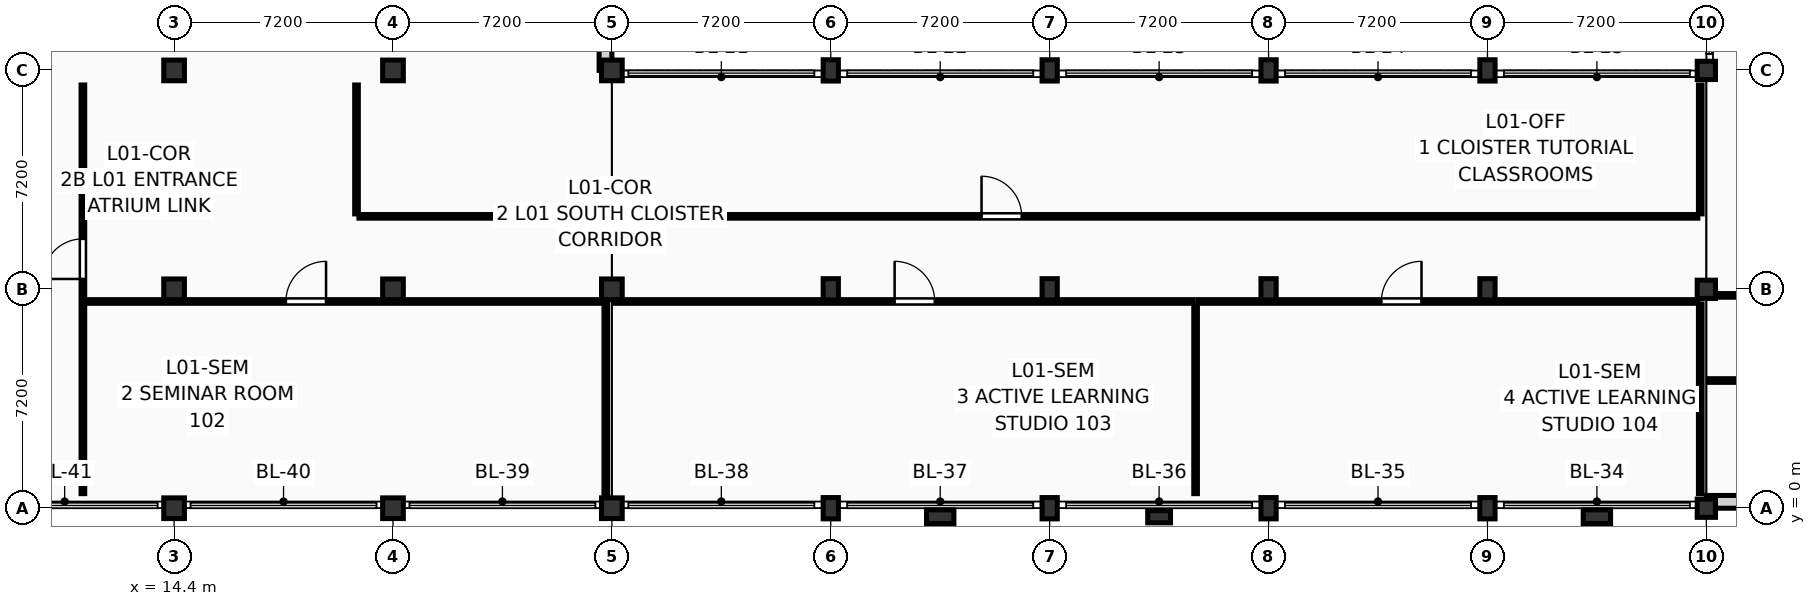
"""IFC4 building model, lengths in metres.
Left out: names, types, materials, properties, quantities, classifications, styles, units other than length and angle.
Written with IfcOpenShell. Run it as: python <this file> out.ifc"""

import sys

from ifc_helpers import new_model, si_unit, direction, frame, frame_2d, origin, origin_2d, place, context, subcontext, project, spatial, rectangle, extrude, element, fill, save


model = new_model("IFC4")
c1 = context("Model", 3, precision=1e-05, world=origin(), true_north=direction((0.0, 1.0)))
c2 = subcontext(c1, "Body", "Model", "MODEL_VIEW")
j1 = project(units=[si_unit("LENGTHUNIT", "METRE"), si_unit("PLANEANGLEUNIT", "RADIAN")], contexts=[c1])
p1 = place(None, origin())
s1 = spatial("IfcSite", under=j1, at=p1, CompositionType="ELEMENT")
p2 = place(p1, origin())
s2 = spatial("IfcBuilding", under=s1, at=p2, CompositionType="ELEMENT")
p3 = place(p2, frame((0.0, 0.0, 4.5)))
s3 = spatial("IfcBuildingStorey", under=s2, at=p3, CompositionType="ELEMENT", Elevation=4.5)
for number, where, z_axis, x_axis in (
    (1, (14.4, 0.0, 0.0), (0.0, 0.0, 1.0), (1.0, 0.0, 0.0)),
    (2, (14.4, 7.2, 0.0), (0.0, 0.0, 1.0), (1.0, 0.0, 0.0)),
    (3, (14.4, 14.4, 0.0), (0.0, 0.0, 1.0), (1.0, 0.0, 0.0)),
    (4, (21.6, 0.0, 0.0), (0.0, 0.0, 1.0), (1.0, 0.0, 0.0)),
    (5, (21.6, 7.2, 0.0), (0.0, 0.0, 1.0), (1.0, 0.0, 0.0)),
    (6, (21.6, 14.4, 0.0), (0.0, 0.0, 1.0), (1.0, 0.0, 0.0)),
    (7, (28.8, 0.0, 0.0), (0.0, 0.0, 1.0), (1.0, 0.0, 0.0)),
    (8, (28.8, 7.2, 0.0), (0.0, 0.0, 1.0), (1.0, 0.0, 0.0)),
    (9, (28.8, 14.4, 0.0), (0.0, 0.0, 1.0), (1.0, 0.0, 0.0)),
):
    element("IfcColumn", number, at=place(p3, frame(where, z_axis=z_axis, x_axis=x_axis)), inside=s3, PredefinedType="COLUMN", context=c2, shape_type="SweptSolid", body=[
        extrude(rectangle(XDim=0.68, YDim=0.68, at=origin_2d()), origin(), (0.0, 0.0, 1.0), 4.05),
    ])
for number, where, z_axis, x_axis in (
    (10, (36.0, 0.0, 0.0), (0.0, 0.0, 1.0), (1.0, 0.0, 0.0)),
    (11, (36.0, 7.2, 0.0), (0.0, 0.0, 1.0), (1.0, 0.0, 0.0)),
    (12, (36.0, 14.4, 0.0), (0.0, 0.0, 1.0), (1.0, 0.0, 0.0)),
    (13, (43.2, 0.0, 0.0), (0.0, 0.0, 1.0), (1.0, 0.0, 0.0)),
    (14, (43.2, 7.2, 0.0), (0.0, 0.0, 1.0), (1.0, 0.0, 0.0)),
    (15, (43.2, 14.4, 0.0), (0.0, 0.0, 1.0), (1.0, 0.0, 0.0)),
    (16, (50.4, 0.0, 0.0), (0.0, 0.0, 1.0), (1.0, 0.0, 0.0)),
    (17, (50.4, 7.2, 0.0), (0.0, 0.0, 1.0), (1.0, 0.0, 0.0)),
    (18, (50.4, 14.4, 0.0), (0.0, 0.0, 1.0), (1.0, 0.0, 0.0)),
    (19, (57.6, 0.0, 0.0), (0.0, 0.0, 1.0), (1.0, 0.0, 0.0)),
    (20, (57.6, 7.2, 0.0), (0.0, 0.0, 1.0), (1.0, 0.0, 0.0)),
    (21, (57.6, 14.4, 0.0), (0.0, 0.0, 1.0), (1.0, 0.0, 0.0)),
):
    element("IfcColumn", number, at=place(p3, frame(where, z_axis=z_axis, x_axis=x_axis)), inside=s3, PredefinedType="COLUMN", context=c2, shape_type="SweptSolid", body=[
        extrude(rectangle(XDim=0.5, YDim=0.7, at=origin_2d()), origin(), (0.0, 0.0, 1.0), 4.05),
    ])
for number, where, z_axis, x_axis in (
    (22, (64.8, 0.0, 0.0), (0.0, 0.0, 1.0), (1.0, 0.0, 0.0)),
    (23, (64.8, 7.2, 0.0), (0.0, 0.0, 1.0), (1.0, 0.0, 0.0)),
    (24, (64.8, 14.4, 0.0), (0.0, 0.0, 1.0), (1.0, 0.0, 0.0)),
):
    element("IfcColumn", number, at=place(p3, frame(where, z_axis=z_axis, x_axis=x_axis)), inside=s3, PredefinedType="COLUMN", context=c2, shape_type="SweptSolid", body=[
        extrude(rectangle(XDim=0.6, YDim=0.6, at=origin_2d()), origin(), (0.0, 0.0, 1.0), 4.05),
    ])
p4 = place(p3, frame((39.6, -0.28, 0.0), z_axis=(0.0, 0.0, 1.0), x_axis=(0.0, 1.0, 0.0)))
e25 = element("IfcColumn", 25, at=p4, inside=s3, PredefinedType="PILASTER", context=c2, shape_type="SweptSolid", body=[
    extrude(rectangle(XDim=0.45, YDim=0.9, at=origin_2d()), origin(), (0.0, 0.0, 1.0), 4.05),
])
p5 = place(p3, frame((46.8, -0.28, 0.0), z_axis=(0.0, 0.0, 1.0), x_axis=(0.0, 1.0, 0.0)))
e26 = element("IfcColumn", 26, at=p5, inside=s3, PredefinedType="PILASTER", context=c2, shape_type="SweptSolid", body=[
    extrude(rectangle(XDim=0.4, YDim=0.75, at=origin_2d()), origin(), (0.0, 0.0, 1.0), 4.05),
])
p6 = place(p3, frame((61.2, -0.28, 0.0), z_axis=(0.0, 0.0, 1.0), x_axis=(0.0, 1.0, 0.0)))
e27 = element("IfcColumn", 27, at=p6, inside=s3, PredefinedType="PILASTER", context=c2, shape_type="SweptSolid", body=[
    extrude(rectangle(XDim=0.45, YDim=0.9, at=origin_2d()), origin(), (0.0, 0.0, 1.0), 4.05),
])
p7 = place(p3, frame((28.59, 14.4, 0.0), z_axis=(0.0, 0.0, 1.0), x_axis=(0.0, 1.0, 0.0)))
e28 = element("IfcWall", 28, at=p7, inside=s3, PredefinedType="SOLIDWALL", context=c2, shape_type="SweptSolid", body=[
    extrude(rectangle(XDim=7.2, YDim=0.42, at=frame_2d((3.6, 0.0))), origin(), (0.0, 0.0, 1.0), 3.16),
])
p8 = place(p7, frame((1.038, 0.0, 0.18)))
e29 = element("IfcOpeningElement", 29, at=p8, cuts=e28, PredefinedType="OPENING", context=c2, shape_type="SweptSolid", body=[
    extrude(rectangle(XDim=1.45, YDim=2.8, at=frame_2d((0.725, 1.4))), frame((0.0, 0.222, 0.0), z_axis=(0.0, -1.0, 0.0), x_axis=(1.0, 0.0, 0.0)), (0.0, 0.0, 1.0), 0.444),
])
p9 = place(p7, frame((2.875, 0.0, 0.18)))
e30 = element("IfcOpeningElement", 30, at=p9, cuts=e28, PredefinedType="OPENING", context=c2, shape_type="SweptSolid", body=[
    extrude(rectangle(XDim=1.45, YDim=2.8, at=frame_2d((0.725, 1.4))), frame((0.0, 0.222, 0.0), z_axis=(0.0, -1.0, 0.0), x_axis=(1.0, 0.0, 0.0)), (0.0, 0.0, 1.0), 0.444),
])
p10 = place(p7, frame((4.712, 0.0, 0.18)))
e31 = element("IfcOpeningElement", 31, at=p10, cuts=e28, PredefinedType="OPENING", context=c2, shape_type="SweptSolid", body=[
    extrude(rectangle(XDim=1.45, YDim=2.8, at=frame_2d((0.725, 1.4))), frame((0.0, 0.222, 0.0), z_axis=(0.0, -1.0, 0.0), x_axis=(1.0, 0.0, 0.0)), (0.0, 0.0, 1.0), 0.444),
])
p11 = place(p3, frame((64.8, 0.21, 0.0), z_axis=(0.0, 0.0, 1.0), x_axis=(1.0, 0.0, 0.0)))
e32 = element("IfcWall", 32, at=p11, inside=s3, PredefinedType="SOLIDWALL", context=c2, shape_type="SweptSolid", body=[
    extrude(rectangle(XDim=7.2, YDim=0.42, at=frame_2d((3.6, 0.0))), origin(), (0.0, 0.0, 1.0), 3.16),
])
p12 = place(p11, frame((1.85, 0.0, 0.45)))
e33 = element("IfcOpeningElement", 33, at=p12, cuts=e32, PredefinedType="OPENING", context=c2, shape_type="SweptSolid", body=[
    extrude(rectangle(XDim=1.2, YDim=2.35, at=frame_2d((0.6, 1.175))), frame((0.0, 0.222, 0.0), z_axis=(0.0, -1.0, 0.0), x_axis=(1.0, 0.0, 0.0)), (0.0, 0.0, 1.0), 0.444),
])
p13 = place(p11, frame((4.15, 0.0, 0.45)))
e34 = element("IfcOpeningElement", 34, at=p13, cuts=e32, PredefinedType="OPENING", context=c2, shape_type="SweptSolid", body=[
    extrude(rectangle(XDim=1.2, YDim=2.35, at=frame_2d((0.6, 1.175))), frame((0.0, 0.222, 0.0), z_axis=(0.0, -1.0, 0.0), x_axis=(1.0, 0.0, 0.0)), (0.0, 0.0, 1.0), 0.444),
])
p14 = place(p3, frame((11.4, 0.48, 0.0), z_axis=(0.0, 0.0, 1.0), x_axis=(0.0, 1.0, 0.0)))
e35 = element("IfcWall", 35, at=p14, inside=s3, PredefinedType="PARTITIONING", context=c2, shape_type="SweptSolid", body=[
    extrude(rectangle(XDim=13.44, YDim=0.12, at=frame_2d((6.72, 0.0))), origin(), (0.0, 0.0, 1.0), 3.775),
])
p15 = place(p14, frame((7.06, 0.0, 0.0)))
e36 = element("IfcOpeningElement", 36, at=p15, cuts=e35, PredefinedType="OPENING", context=c2, shape_type="SweptSolid", body=[
    extrude(rectangle(XDim=1.32, YDim=2.2, at=frame_2d((0.66, 1.1))), frame((0.0, 0.072, 0.0), z_axis=(0.0, -1.0, 0.0), x_axis=(1.0, 0.0, 0.0)), (0.0, 0.0, 1.0), 0.144),
])
p16 = place(p3, frame((28.6, 0.48, 0.0), z_axis=(0.0, 0.0, 1.0), x_axis=(0.0, 1.0, 0.0)))
e37 = element("IfcWall", 37, at=p16, inside=s3, PredefinedType="PARTITIONING", context=c2, shape_type="SweptSolid", body=[
    extrude(rectangle(XDim=6.24, YDim=0.12, at=frame_2d((3.12, 0.0))), origin(), (0.0, 0.0, 1.0), 2.925),
])
p17 = place(p3, frame((11.5, 6.8, 0.0), z_axis=(0.0, 0.0, 1.0), x_axis=(1.0, 0.0, 0.0)))
e38 = element("IfcWall", 38, at=p17, inside=s3, PredefinedType="PARTITIONING", context=c2, shape_type="SweptSolid", body=[
    extrude(rectangle(XDim=17.02, YDim=0.12, at=frame_2d((8.51, 0.0))), origin(), (0.0, 0.0, 1.0), 3.025),
])
p18 = place(p17, frame((6.578, 0.0, 0.0)))
e39 = element("IfcOpeningElement", 39, at=p18, cuts=e38, PredefinedType="OPENING", context=c2, shape_type="SweptSolid", body=[
    extrude(rectangle(XDim=1.32, YDim=2.2, at=frame_2d((0.66, 1.1))), frame((0.0, 0.072, 0.0), z_axis=(0.0, -1.0, 0.0), x_axis=(1.0, 0.0, 0.0)), (0.0, 0.0, 1.0), 0.144),
])
p19 = place(p3, frame((48.0, 0.48, 0.0), z_axis=(0.0, 0.0, 1.0), x_axis=(0.0, 1.0, 0.0)))
e40 = element("IfcWall", 40, at=p19, inside=s3, PredefinedType="PARTITIONING", context=c2, shape_type="SweptSolid", body=[
    extrude(rectangle(XDim=6.24, YDim=0.12, at=frame_2d((3.12, 0.0))), origin(), (0.0, 0.0, 1.0), 3.775),
])
p20 = place(p3, frame((28.88, 6.8, 0.0), z_axis=(0.0, 0.0, 1.0), x_axis=(1.0, 0.0, 0.0)))
e41 = element("IfcWall", 41, at=p20, inside=s3, PredefinedType="PARTITIONING", context=c2, shape_type="SweptSolid", body=[
    extrude(rectangle(XDim=19.04, YDim=0.12, at=frame_2d((9.52, 0.0))), origin(), (0.0, 0.0, 1.0), 3.025),
])
p21 = place(p20, frame((9.22, 0.0, 0.0)))
e42 = element("IfcOpeningElement", 42, at=p21, cuts=e41, PredefinedType="OPENING", context=c2, shape_type="SweptSolid", body=[
    extrude(rectangle(XDim=1.32, YDim=2.2, at=frame_2d((0.66, 1.1))), frame((0.0, 0.072, 0.0), z_axis=(0.0, -1.0, 0.0), x_axis=(1.0, 0.0, 0.0)), (0.0, 0.0, 1.0), 0.144),
])
p22 = place(p3, frame((64.6, 0.48, 0.0), z_axis=(0.0, 0.0, 1.0), x_axis=(0.0, 1.0, 0.0)))
e43 = element("IfcWall", 43, at=p22, inside=s3, PredefinedType="PARTITIONING", context=c2, shape_type="SweptSolid", body=[
    extrude(rectangle(XDim=6.24, YDim=0.12, at=frame_2d((3.12, 0.0))), origin(), (0.0, 0.0, 1.0), 2.925),
])
p23 = place(p3, frame((48.08, 6.8, 0.0), z_axis=(0.0, 0.0, 1.0), x_axis=(1.0, 0.0, 0.0)))
e44 = element("IfcWall", 44, at=p23, inside=s3, PredefinedType="PARTITIONING", context=c2, shape_type="SweptSolid", body=[
    extrude(rectangle(XDim=16.44, YDim=0.12, at=frame_2d((8.22, 0.0))), origin(), (0.0, 0.0, 1.0), 3.025),
])
p24 = place(p23, frame((6.031, 0.0, 0.0)))
e45 = element("IfcOpeningElement", 45, at=p24, cuts=e44, PredefinedType="OPENING", context=c2, shape_type="SweptSolid", body=[
    extrude(rectangle(XDim=1.32, YDim=2.2, at=frame_2d((0.66, 1.1))), frame((0.0, 0.072, 0.0), z_axis=(0.0, -1.0, 0.0), x_axis=(1.0, 0.0, 0.0)), (0.0, 0.0, 1.0), 0.144),
])
p25 = place(p3, frame((20.4, 9.68, 0.0), z_axis=(0.0, 0.0, 1.0), x_axis=(0.0, 1.0, 0.0)))
e46 = element("IfcWall", 46, at=p25, inside=s3, PredefinedType="PARTITIONING", context=c2, shape_type="SweptSolid", body=[
    extrude(rectangle(XDim=4.24, YDim=0.12, at=frame_2d((2.12, 0.0))), origin(), (0.0, 0.0, 1.0), 3.775),
])
p26 = place(p3, frame((20.48, 9.6, 0.0), z_axis=(0.0, 0.0, 1.0), x_axis=(1.0, 0.0, 0.0)))
e47 = element("IfcWall", 47, at=p26, inside=s3, PredefinedType="PARTITIONING", context=c2, shape_type="SweptSolid", body=[
    extrude(rectangle(XDim=44.04, YDim=0.12, at=frame_2d((22.02, 0.0))), origin(), (0.0, 0.0, 1.0), 3.775),
])
p27 = place(p26, frame((20.479, 0.0, 0.0)))
e48 = element("IfcOpeningElement", 48, at=p27, cuts=e47, PredefinedType="OPENING", context=c2, shape_type="SweptSolid", body=[
    extrude(rectangle(XDim=1.32, YDim=2.2, at=frame_2d((0.66, 1.1))), frame((0.0, 0.072, 0.0), z_axis=(0.0, -1.0, 0.0), x_axis=(1.0, 0.0, 0.0)), (0.0, 0.0, 1.0), 0.144),
])
p28 = place(p3, frame((64.6, 9.68, 0.0), z_axis=(0.0, 0.0, 1.0), x_axis=(0.0, 1.0, 0.0)))
e49 = element("IfcWall", 49, at=p28, inside=s3, PredefinedType="PARTITIONING", context=c2, shape_type="SweptSolid", body=[
    extrude(rectangle(XDim=4.24, YDim=0.12, at=frame_2d((2.12, 0.0))), origin(), (0.0, 0.0, 1.0), 2.925),
])
p29 = place(p3, frame((64.88, 4.2, 0.0), z_axis=(0.0, 0.0, 1.0), x_axis=(1.0, 0.0, 0.0)))
e50 = element("IfcWall", 50, at=p29, inside=s3, PredefinedType="PARTITIONING", context=c2, shape_type="SweptSolid", body=[
    extrude(rectangle(XDim=36.44, YDim=0.12, at=frame_2d((18.22, 0.0))), origin(), (0.0, 0.0, 1.0), 3.775),
])
p30 = place(p29, frame((17.56, 0.0, 0.0)))
e51 = element("IfcOpeningElement", 51, at=p30, cuts=e50, PredefinedType="OPENING", context=c2, shape_type="SweptSolid", body=[
    extrude(rectangle(XDim=1.32, YDim=2.2, at=frame_2d((0.66, 1.1))), frame((0.0, 0.072, 0.0), z_axis=(0.0, -1.0, 0.0), x_axis=(1.0, 0.0, 0.0)), (0.0, 0.0, 1.0), 0.144),
])
p31 = place(p3, frame((64.88, 7.0, 0.0), z_axis=(0.0, 0.0, 1.0), x_axis=(1.0, 0.0, 0.0)))
e52 = element("IfcWall", 52, at=p31, inside=s3, PredefinedType="PARTITIONING", context=c2, shape_type="SweptSolid", body=[
    extrude(rectangle(XDim=14.04, YDim=0.12, at=frame_2d((7.02, 0.0))), origin(), (0.0, 0.0, 1.0), 3.025),
])
p32 = place(p15, origin())
e53 = element("IfcDoor", 53, at=p32, inside=s3, OperationType="SINGLE_SWING_LEFT", PredefinedType="DOOR", context=c2, shape_type="SweptSolid", body=[
    extrude(rectangle(XDim=1.32, YDim=2.2, at=frame_2d((0.66, 1.1))), frame((0.0, 0.025, 0.0), z_axis=(0.0, -1.0, 0.0), x_axis=(1.0, 0.0, 0.0)), (0.0, 0.0, 1.0), 0.05),
])
fill(e36, e53)
p33 = place(p18, origin())
e54 = element("IfcDoor", 54, at=p33, inside=s3, OperationType="SINGLE_SWING_RIGHT", PredefinedType="DOOR", context=c2, shape_type="SweptSolid", body=[
    extrude(rectangle(XDim=1.32, YDim=2.2, at=frame_2d((0.66, 1.1))), frame((0.0, 0.025, 0.0), z_axis=(0.0, -1.0, 0.0), x_axis=(1.0, 0.0, 0.0)), (0.0, 0.0, 1.0), 0.05),
])
fill(e39, e54)
p34 = place(p21, origin())
e55 = element("IfcDoor", 55, at=p34, inside=s3, OperationType="SINGLE_SWING_LEFT", PredefinedType="DOOR", context=c2, shape_type="SweptSolid", body=[
    extrude(rectangle(XDim=1.32, YDim=2.2, at=frame_2d((0.66, 1.1))), frame((0.0, 0.025, 0.0), z_axis=(0.0, -1.0, 0.0), x_axis=(1.0, 0.0, 0.0)), (0.0, 0.0, 1.0), 0.05),
])
fill(e42, e55)
p35 = place(p24, origin())
e56 = element("IfcDoor", 56, at=p35, inside=s3, OperationType="SINGLE_SWING_RIGHT", PredefinedType="DOOR", context=c2, shape_type="SweptSolid", body=[
    extrude(rectangle(XDim=1.32, YDim=2.2, at=frame_2d((0.66, 1.1))), frame((0.0, 0.025, 0.0), z_axis=(0.0, -1.0, 0.0), x_axis=(1.0, 0.0, 0.0)), (0.0, 0.0, 1.0), 0.05),
])
fill(e45, e56)
p36 = place(p27, origin())
e57 = element("IfcDoor", 57, at=p36, inside=s3, OperationType="SINGLE_SWING_LEFT", PredefinedType="DOOR", context=c2, shape_type="SweptSolid", body=[
    extrude(rectangle(XDim=1.32, YDim=2.2, at=frame_2d((0.66, 1.1))), frame((0.0, 0.025, 0.0), z_axis=(0.0, -1.0, 0.0), x_axis=(1.0, 0.0, 0.0)), (0.0, 0.0, 1.0), 0.05),
])
fill(e48, e57)
save(model, sys.argv[1])
